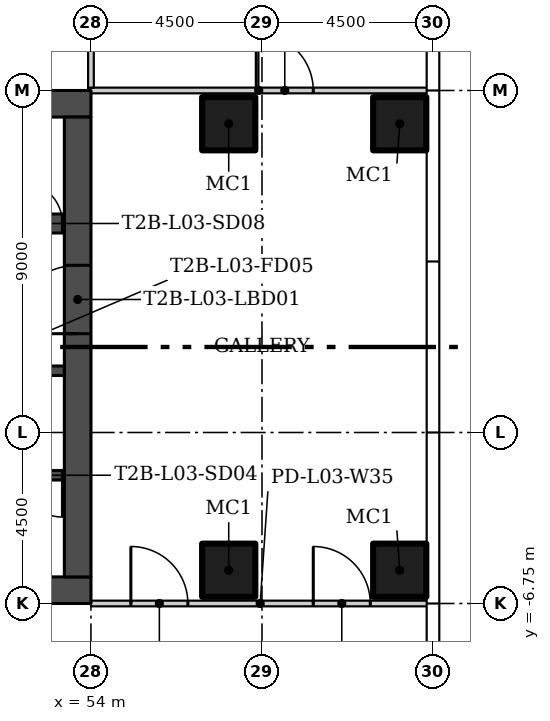
"""IFC4 building model, lengths in metres.
Left out: names, types, materials, properties, quantities, classifications, styles, units other than length and angle.
Written with IfcOpenShell. Run it as: python <this file> out.ifc"""

import sys

from ifc_helpers import new_model, si_unit, direction, frame, frame_2d, origin, origin_2d, place, context, subcontext, project, spatial, rectangle, hollow_rectangle, extrude, element, fill, save


model = new_model("IFC4")
c1 = context("Model", 3, precision=1e-05, world=origin(), true_north=direction((0.0, 1.0)))
c2 = subcontext(c1, "Body", "Model", "MODEL_VIEW")
j1 = project(units=[si_unit("LENGTHUNIT", "METRE"), si_unit("PLANEANGLEUNIT", "RADIAN")], contexts=[c1])
p1 = place(None, origin())
s1 = spatial("IfcSite", under=j1, at=p1, CompositionType="ELEMENT")
p2 = place(p1, origin())
s2 = spatial("IfcBuilding", under=s1, at=p2, CompositionType="ELEMENT")
p3 = place(p2, frame((0.0, 0.0, 18.5)))
s3 = spatial("IfcBuildingStorey", under=s2, at=p3, CompositionType="ELEMENT", Elevation=18.5)
for number, where in (
    (1, (57.625, -5.875, 0.0)),
    (2, (62.125, -5.875, 0.0)),
    (3, (57.625, 5.875, 0.0)),
    (4, (62.125, 5.875, 0.0)),
):
    element("IfcColumn", number, at=place(p3, frame(where)), inside=s3, PredefinedType="COLUMN", context=c2, shape_type="SweptSolid", body=[
        extrude(hollow_rectangle(XDim=1.4, YDim=1.4, WallThickness=0.06, at=origin_2d()), origin(), (0.0, 0.0, 1.0), 4.6),
    ])
p4 = place(p3, frame((53.925, 6.75, 0.0)))
e5 = element("IfcWall", 5, at=p4, inside=s3, PredefinedType="PARTITIONING", context=c2, shape_type="SweptSolid", body=[
    extrude(rectangle(XDim=8.98, YDim=0.15, at=frame_2d((4.49, 0.0))), origin(), (0.0, 0.0, 1.0), 4.6),
])
p5 = place(p4, frame((4.425, 0.0, 0.0)))
e6 = element("IfcOpeningElement", 6, at=p5, cuts=e5, PredefinedType="OPENING", context=c2, shape_type="SweptSolid", body=[
    extrude(rectangle(XDim=1.5, YDim=2.1, at=frame_2d((0.75, 1.05))), frame((0.0, 0.085, 0.0), z_axis=(0.0, -1.0, 0.0), x_axis=(1.0, 0.0, 0.0)), (0.0, 0.0, 1.0), 0.17),
])
p6 = place(p3, frame((54.0, -6.75, 0.0)))
e7 = element("IfcWall", 7, at=p6, inside=s3, PredefinedType="PARTITIONING", context=c2, shape_type="SweptSolid", body=[
    extrude(rectangle(XDim=8.905, YDim=0.15, at=frame_2d((4.453, 0.0))), origin(), (0.0, 0.0, 1.0), 4.6),
])
p7 = place(p6, frame((1.05, 0.0, 0.0)))
e8 = element("IfcOpeningElement", 8, at=p7, cuts=e7, PredefinedType="OPENING", context=c2, shape_type="SweptSolid", body=[
    extrude(rectangle(XDim=1.5, YDim=2.4, at=frame_2d((0.75, 1.2))), frame((0.0, 0.085, 0.0), z_axis=(0.0, -1.0, 0.0), x_axis=(1.0, 0.0, 0.0)), (0.0, 0.0, 1.0), 0.17),
])
p8 = place(p6, frame((5.85, 0.0, 0.0)))
e9 = element("IfcOpeningElement", 9, at=p8, cuts=e7, PredefinedType="OPENING", context=c2, shape_type="SweptSolid", body=[
    extrude(rectangle(XDim=1.5, YDim=2.4, at=frame_2d((0.75, 1.2))), frame((0.0, 0.085, 0.0), z_axis=(0.0, -1.0, 0.0), x_axis=(1.0, 0.0, 0.0)), (0.0, 0.0, 1.0), 0.17),
])
p9 = place(p3, frame((54.0, 15.675, 0.0), z_axis=(0.0, 0.0, 1.0), x_axis=(0.0, -1.0, 0.0)))
e10 = element("IfcWall", 10, at=p9, inside=s3, PredefinedType="PARTITIONING", context=c2, shape_type="SweptSolid", body=[
    extrude(rectangle(XDim=8.85, YDim=0.15, at=frame_2d((4.425, 0.0))), origin(), (0.0, 0.0, 1.0), 4.6),
])
for number, where, z_axis, x_axis in (
    (11, (54.0, -6.4, 0.0), (0.0, 0.0, 1.0), (-1.0, 0.0, 0.0)),
    (12, (54.0, 6.4, 0.0), (0.0, 0.0, 1.0), (-1.0, 0.0, 0.0)),
):
    element("IfcWall", number, at=place(p3, frame(where, z_axis=z_axis, x_axis=x_axis)), inside=s3, PredefinedType="SHEAR", context=c2, shape_type="SweptSolid", body=[
        extrude(rectangle(XDim=13.5, YDim=0.7, at=frame_2d((6.75, 0.0))), origin(), (0.0, 0.0, 1.0), 4.6),
    ])
p10 = place(p3, frame((53.65, -6.05, 0.0), z_axis=(0.0, 0.0, 1.0), x_axis=(0.0, 1.0, 0.0)))
e13 = element("IfcWall", 13, at=p10, inside=s3, PredefinedType="SHEAR", context=c2, shape_type="SweptSolid", body=[
    extrude(rectangle(XDim=12.1, YDim=0.7, at=frame_2d((6.05, 0.0))), origin(), (0.0, 0.0, 1.0), 4.6),
])
p11 = place(p10, frame((6.4, 0.0, 0.0)))
e14 = element("IfcOpeningElement", 14, at=p11, cuts=e13, PredefinedType="OPENING", context=c2, shape_type="SweptSolid", body=[
    extrude(rectangle(XDim=1.8, YDim=2.4, at=frame_2d((0.9, 1.2))), frame((0.0, 0.36, 0.0), z_axis=(0.0, -1.0, 0.0), x_axis=(1.0, 0.0, 0.0)), (0.0, 0.0, 1.0), 0.72),
])
p12 = place(p3, frame((53.3, -3.375, 0.0), z_axis=(0.0, 0.0, 1.0), x_axis=(-1.0, 0.0, 0.0)))
e15 = element("IfcWall", 15, at=p12, inside=s3, PredefinedType="SHEAR", context=c2, shape_type="SweptSolid", body=[
    extrude(rectangle(XDim=12.1, YDim=0.25, at=frame_2d((6.05, 0.0))), origin(), (0.0, 0.0, 1.0), 4.6),
])
p13 = place(p12, frame((0.05, 0.0, 0.0)))
e16 = element("IfcOpeningElement", 16, at=p13, cuts=e15, PredefinedType="OPENING", context=c2, shape_type="SweptSolid", body=[
    extrude(rectangle(XDim=1.1, YDim=2.1, at=frame_2d((0.55, 1.05))), frame((0.0, 0.135, 0.0), z_axis=(0.0, -1.0, 0.0), x_axis=(1.0, 0.0, 0.0)), (0.0, 0.0, 1.0), 0.27),
])
p14 = place(p3, frame((53.3, -0.625, 0.0), z_axis=(0.0, 0.0, 1.0), x_axis=(-1.0, 0.0, 0.0)))
e17 = element("IfcWall", 17, at=p14, inside=s3, PredefinedType="SHEAR", context=c2, shape_type="SweptSolid", body=[
    extrude(rectangle(XDim=12.1, YDim=0.25, at=frame_2d((6.05, 0.0))), origin(), (0.0, 0.0, 1.0), 4.6),
])
p15 = place(p14, frame((2.25, 0.0, 0.0)))
e18 = element("IfcOpeningElement", 18, at=p15, cuts=e17, PredefinedType="OPENING", context=c2, shape_type="SweptSolid", body=[
    extrude(rectangle(XDim=1.2, YDim=2.1, at=frame_2d((0.6, 1.05))), frame((0.0, 0.135, 0.0), z_axis=(0.0, -1.0, 0.0), x_axis=(1.0, 0.0, 0.0)), (0.0, 0.0, 1.0), 0.27),
])
p16 = place(p14, frame((10.025, 0.0, 0.0)))
e19 = element("IfcOpeningElement", 19, at=p16, cuts=e17, PredefinedType="OPENING", context=c2, shape_type="SweptSolid", body=[
    extrude(rectangle(XDim=0.9, YDim=2.1, at=frame_2d((0.45, 1.05))), frame((0.0, 0.135, 0.0), z_axis=(0.0, -1.0, 0.0), x_axis=(1.0, 0.0, 0.0)), (0.0, 0.0, 1.0), 0.27),
])
p17 = place(p3, frame((46.0, 3.25, 0.0)))
e20 = element("IfcWall", 20, at=p17, inside=s3, PredefinedType="SHEAR", context=c2, shape_type="SweptSolid", body=[
    extrude(rectangle(XDim=7.3, YDim=0.5, at=frame_2d((3.65, 0.0))), origin(), (0.0, 0.0, 1.0), 4.6),
])
p18 = place(p17, frame((6.15, 0.0, 0.0)))
e21 = element("IfcOpeningElement", 21, at=p18, cuts=e20, PredefinedType="OPENING", context=c2, shape_type="SweptSolid", body=[
    extrude(rectangle(XDim=1.1, YDim=2.1, at=frame_2d((0.55, 1.05))), frame((0.0, 0.26, 0.0), z_axis=(0.0, -1.0, 0.0), x_axis=(1.0, 0.0, 0.0)), (0.0, 0.0, 1.0), 0.52),
])
p19 = place(p7, origin())
e22 = element("IfcDoor", 22, at=p19, inside=s3, OperationType="DOUBLE_DOOR_SINGLE_SWING", PredefinedType="DOOR", context=c2, shape_type="SweptSolid", body=[
    extrude(rectangle(XDim=1.5, YDim=2.4, at=frame_2d((0.75, 1.2))), frame((0.0, 0.025, 0.0), z_axis=(0.0, -1.0, 0.0), x_axis=(1.0, 0.0, 0.0)), (0.0, 0.0, 1.0), 0.05),
])
fill(e8, e22)
p20 = place(p8, origin())
e23 = element("IfcDoor", 23, at=p20, inside=s3, OperationType="DOUBLE_DOOR_SINGLE_SWING", PredefinedType="DOOR", context=c2, shape_type="SweptSolid", body=[
    extrude(rectangle(XDim=1.5, YDim=2.4, at=frame_2d((0.75, 1.2))), frame((0.0, 0.025, 0.0), z_axis=(0.0, -1.0, 0.0), x_axis=(1.0, 0.0, 0.0)), (0.0, 0.0, 1.0), 0.05),
])
fill(e9, e23)
p21 = place(p5, origin())
e24 = element("IfcDoor", 24, at=p21, inside=s3, OperationType="DOUBLE_DOOR_SINGLE_SWING", PredefinedType="DOOR", context=c2, shape_type="SweptSolid", body=[
    extrude(rectangle(XDim=1.5, YDim=2.1, at=frame_2d((0.75, 1.05))), frame((0.0, 0.025, 0.0), z_axis=(0.0, -1.0, 0.0), x_axis=(1.0, 0.0, 0.0)), (0.0, 0.0, 1.0), 0.05),
])
fill(e6, e24)
p22 = place(p11, origin())
e25 = element("IfcDoor", 25, at=p22, inside=s3, OperationType="DOUBLE_DOOR_SINGLE_SWING", PredefinedType="DOOR", context=c2, shape_type="SweptSolid", body=[
    extrude(rectangle(XDim=1.8, YDim=2.4, at=frame_2d((0.9, 1.2))), frame((0.0, 0.025, 0.0), z_axis=(0.0, -1.0, 0.0), x_axis=(1.0, 0.0, 0.0)), (0.0, 0.0, 1.0), 0.05),
])
fill(e14, e25)
p23 = place(p13, origin())
e26 = element("IfcDoor", 26, at=p23, inside=s3, OperationType="SINGLE_SWING_LEFT", PredefinedType="DOOR", context=c2, shape_type="SweptSolid", body=[
    extrude(rectangle(XDim=1.1, YDim=2.1, at=frame_2d((0.55, 1.05))), frame((0.0, 0.025, 0.0), z_axis=(0.0, -1.0, 0.0), x_axis=(1.0, 0.0, 0.0)), (0.0, 0.0, 1.0), 0.05),
])
fill(e16, e26)
p24 = place(p18, origin())
e27 = element("IfcDoor", 27, at=p24, inside=s3, OperationType="SINGLE_SWING_RIGHT", PredefinedType="DOOR", context=c2, shape_type="SweptSolid", body=[
    extrude(rectangle(XDim=1.1, YDim=2.1, at=frame_2d((0.55, 1.05))), frame((0.0, 0.025, 0.0), z_axis=(0.0, -1.0, 0.0), x_axis=(1.0, 0.0, 0.0)), (0.0, 0.0, 1.0), 0.05),
])
fill(e21, e27)
save(model, sys.argv[1])
